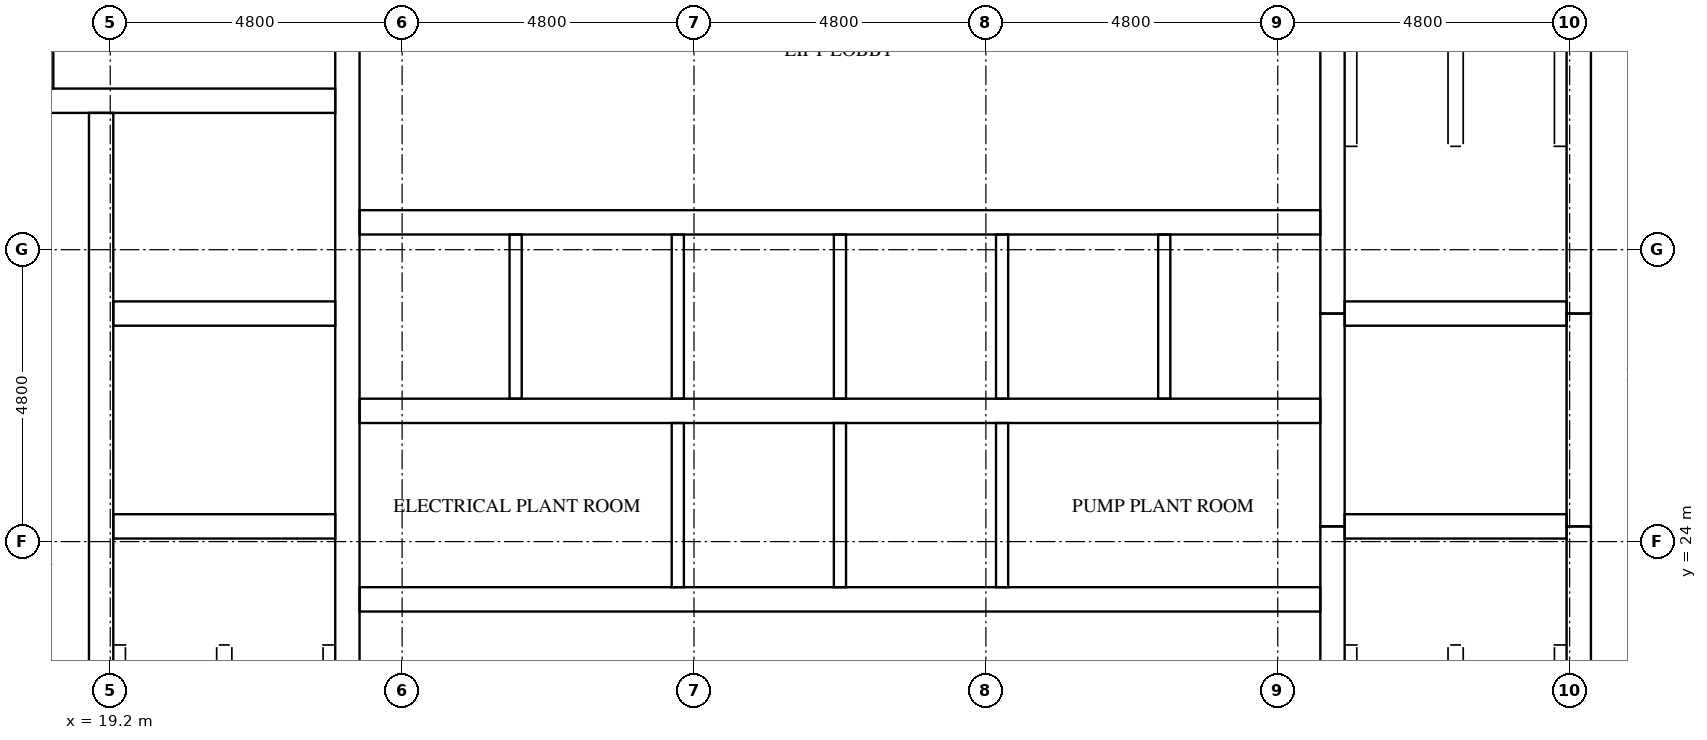
"""IFC4 building model, lengths in metres.
Left out: names, types, materials, properties, quantities, classifications, styles, units other than length and angle.
Written with IfcOpenShell. Run it as: python <this file> out.ifc"""

import sys

from ifc_helpers import new_model, si_unit, direction, frame, frame_2d, origin, place, context, subcontext, project, spatial, rectangle, extrude, element, fill, save


model = new_model("IFC4")
c1 = context("Model", 3, precision=1e-05, world=origin(), true_north=direction((0.0, 1.0)))
c2 = subcontext(c1, "Body", "Model", "MODEL_VIEW")
j1 = project(units=[si_unit("LENGTHUNIT", "METRE"), si_unit("PLANEANGLEUNIT", "RADIAN")], contexts=[c1])
p1 = place(None, origin())
s1 = spatial("IfcSite", under=j1, at=p1, CompositionType="ELEMENT")
p2 = place(p1, origin())
s2 = spatial("IfcBuilding", under=s1, at=p2, CompositionType="ELEMENT")
p3 = place(p2, frame((0.0, 0.0, 286.1)))
s3 = spatial("IfcBuildingStorey", under=s2, at=p3, CompositionType="ELEMENT", Elevation=286.1)
p4 = place(p3, frame((19.05, 15.5, 0.0), z_axis=(0.0, 0.0, 1.0), x_axis=(0.0, 1.0, 0.0)))
e1 = element("IfcWall", 1, at=p4, inside=s3, PredefinedType="SHEAR", context=c2, shape_type="SweptSolid", body=[
    extrude(rectangle(XDim=15.55, YDim=0.4, at=frame_2d((7.775, 0.0))), origin(), (0.0, 0.0, 1.0), 5.1),
])
p5 = place(p4, frame((9.95, 0.0, 0.0)))
e2 = element("IfcOpeningElement", 2, at=p5, cuts=e1, PredefinedType="OPENING", context=c2, shape_type="SweptSolid", body=[
    extrude(rectangle(XDim=1.1, YDim=2.1, at=frame_2d((0.55, 1.05))), frame((0.0, 0.21, 0.0), z_axis=(0.0, -1.0, 0.0), x_axis=(1.0, 0.0, 0.0)), (0.0, 0.0, 1.0), 0.42),
])
p6 = place(p4, frame((13.45, 0.0, 0.0)))
e3 = element("IfcOpeningElement", 3, at=p6, cuts=e1, PredefinedType="OPENING", context=c2, shape_type="SweptSolid", body=[
    extrude(rectangle(XDim=1.1, YDim=2.1, at=frame_2d((0.55, 1.05))), frame((0.0, 0.21, 0.0), z_axis=(0.0, -1.0, 0.0), x_axis=(1.0, 0.0, 0.0)), (0.0, 0.0, 1.0), 0.42),
])
p7 = place(p4, frame((0.7, 0.0, 0.0)))
e4 = element("IfcOpeningElement", 4, at=p7, cuts=e1, PredefinedType="OPENING", context=c2, shape_type="SweptSolid", body=[
    extrude(rectangle(XDim=1.2, YDim=2.1, at=frame_2d((0.6, 1.05))), frame((0.0, 0.21, 0.0), z_axis=(0.0, -1.0, 0.0), x_axis=(1.0, 0.0, 0.0)), (0.0, 0.0, 1.0), 0.42),
])
p8 = place(p3, frame((23.1, 15.5, 0.0), z_axis=(0.0, 0.0, 1.0), x_axis=(0.0, 1.0, 0.0)))
e5 = element("IfcWall", 5, at=p8, inside=s3, PredefinedType="SHEAR", context=c2, shape_type="SweptSolid", body=[
    extrude(rectangle(XDim=21.8, YDim=0.4, at=frame_2d((10.9, 0.0))), origin(), (0.0, 0.0, 1.0), 5.1),
])
p9 = place(p3, frame((39.3, 15.5, 0.0), z_axis=(0.0, 0.0, 1.0), x_axis=(0.0, 1.0, 0.0)))
e6 = element("IfcWall", 6, at=p9, inside=s3, PredefinedType="SHEAR", context=c2, shape_type="SweptSolid", body=[
    extrude(rectangle(XDim=8.75, YDim=0.4, at=frame_2d((4.375, 0.0))), origin(), (0.0, 0.0, 1.0), 5.1),
])
p10 = place(p3, frame((39.3, 24.25, 0.0), z_axis=(0.0, 0.0, 1.0), x_axis=(0.0, 1.0, 0.0)))
e7 = element("IfcWall", 7, at=p10, inside=s3, PredefinedType="SHEAR", context=c2, shape_type="SweptSolid", body=[
    extrude(rectangle(XDim=3.5, YDim=0.4, at=frame_2d((1.75, 0.0))), origin(), (0.0, 0.0, 1.0), 5.1),
])
p11 = place(p3, frame((39.3, 27.75, 0.0), z_axis=(0.0, 0.0, 1.0), x_axis=(0.0, 1.0, 0.0)))
e8 = element("IfcWall", 8, at=p11, inside=s3, PredefinedType="SHEAR", context=c2, shape_type="SweptSolid", body=[
    extrude(rectangle(XDim=9.55, YDim=0.4, at=frame_2d((4.775, 0.0))), origin(), (0.0, 0.0, 1.0), 5.1),
])
p12 = place(p3, frame((43.35, 15.5, 0.0), z_axis=(0.0, 0.0, 1.0), x_axis=(0.0, 1.0, 0.0)))
e9 = element("IfcWall", 9, at=p12, inside=s3, PredefinedType="SHEAR", context=c2, shape_type="SweptSolid", body=[
    extrude(rectangle(XDim=8.75, YDim=0.4, at=frame_2d((4.375, 0.0))), origin(), (0.0, 0.0, 1.0), 5.1),
])
p13 = place(p12, frame((0.7, 0.0, 0.0)))
e10 = element("IfcOpeningElement", 10, at=p13, cuts=e9, PredefinedType="OPENING", context=c2, shape_type="SweptSolid", body=[
    extrude(rectangle(XDim=1.2, YDim=2.1, at=frame_2d((0.6, 1.05))), frame((0.0, 0.21, 0.0), z_axis=(0.0, -1.0, 0.0), x_axis=(1.0, 0.0, 0.0)), (0.0, 0.0, 1.0), 0.42),
])
p14 = place(p3, frame((43.35, 24.25, 0.0), z_axis=(0.0, 0.0, 1.0), x_axis=(0.0, 1.0, 0.0)))
e11 = element("IfcWall", 11, at=p14, inside=s3, PredefinedType="SHEAR", context=c2, shape_type="SweptSolid", body=[
    extrude(rectangle(XDim=3.5, YDim=0.4, at=frame_2d((1.75, 0.0))), origin(), (0.0, 0.0, 1.0), 5.1),
])
p15 = place(p14, frame((1.2, 0.0, 0.0)))
e12 = element("IfcOpeningElement", 12, at=p15, cuts=e11, PredefinedType="OPENING", context=c2, shape_type="SweptSolid", body=[
    extrude(rectangle(XDim=1.1, YDim=2.1, at=frame_2d((0.55, 1.05))), frame((0.0, 0.21, 0.0), z_axis=(0.0, -1.0, 0.0), x_axis=(1.0, 0.0, 0.0)), (0.0, 0.0, 1.0), 0.42),
])
p16 = place(p3, frame((43.35, 27.75, 0.0), z_axis=(0.0, 0.0, 1.0), x_axis=(0.0, 1.0, 0.0)))
e13 = element("IfcWall", 13, at=p16, inside=s3, PredefinedType="SHEAR", context=c2, shape_type="SweptSolid", body=[
    extrude(rectangle(XDim=9.55, YDim=0.4, at=frame_2d((4.775, 0.0))), origin(), (0.0, 0.0, 1.0), 5.1),
])
p17 = place(p16, frame((7.65, 0.0, 0.0)))
e14 = element("IfcOpeningElement", 14, at=p17, cuts=e13, PredefinedType="OPENING", context=c2, shape_type="SweptSolid", body=[
    extrude(rectangle(XDim=1.2, YDim=2.1, at=frame_2d((0.6, 1.05))), frame((0.0, 0.21, 0.0), z_axis=(0.0, -1.0, 0.0), x_axis=(1.0, 0.0, 0.0)), (0.0, 0.0, 1.0), 0.42),
])
for number, where, z_axis, x_axis in (
    (15, (19.25, 24.25, 0.0), (0.0, 0.0, 1.0), (1.0, 0.0, 0.0)),
    (16, (19.25, 27.75, 0.0), (0.0, 0.0, 1.0), (1.0, 0.0, 0.0)),
):
    element("IfcWall", number, at=place(p3, frame(where, z_axis=z_axis, x_axis=x_axis)), inside=s3, PredefinedType="SHEAR", context=c2, shape_type="SweptSolid", body=[
        extrude(rectangle(XDim=3.65, YDim=0.4, at=frame_2d((1.825, 0.0))), origin(), (0.0, 0.0, 1.0), 5.1),
    ])
p18 = place(p3, frame((15.5, 31.25, 0.0), z_axis=(0.0, 0.0, 1.0), x_axis=(1.0, 0.0, 0.0)))
e17 = element("IfcWall", 17, at=p18, inside=s3, PredefinedType="SHEAR", context=c2, shape_type="SweptSolid", body=[
    extrude(rectangle(XDim=7.4, YDim=0.4, at=frame_2d((3.7, 0.0))), origin(), (0.0, 0.0, 1.0), 5.1),
])
for number, where, z_axis, x_axis in (
    (18, (39.5, 24.25, 0.0), (0.0, 0.0, 1.0), (1.0, 0.0, 0.0)),
    (19, (39.5, 27.75, 0.0), (0.0, 0.0, 1.0), (1.0, 0.0, 0.0)),
):
    element("IfcWall", number, at=place(p3, frame(where, z_axis=z_axis, x_axis=x_axis)), inside=s3, PredefinedType="SHEAR", context=c2, shape_type="SweptSolid", body=[
        extrude(rectangle(XDim=3.65, YDim=0.4, at=frame_2d((1.825, 0.0))), origin(), (0.0, 0.0, 1.0), 5.1),
    ])
p19 = place(p3, frame((23.3, 23.05, 0.0), z_axis=(0.0, 0.0, 1.0), x_axis=(1.0, 0.0, 0.0)))
e20 = element("IfcWall", 20, at=p19, inside=s3, PredefinedType="SHEAR", context=c2, shape_type="SweptSolid", body=[
    extrude(rectangle(XDim=15.8, YDim=0.4, at=frame_2d((7.9, 0.0))), origin(), (0.0, 0.0, 1.0), 5.1),
])
p20 = place(p19, frame((6.017, 0.0, 0.0)))
e21 = element("IfcOpeningElement", 21, at=p20, cuts=e20, PredefinedType="OPENING", context=c2, shape_type="SweptSolid", body=[
    extrude(rectangle(XDim=1.1, YDim=2.1, at=frame_2d((0.55, 1.05))), frame((0.0, 0.21, 0.0), z_axis=(0.0, -1.0, 0.0), x_axis=(1.0, 0.0, 0.0)), (0.0, 0.0, 1.0), 0.42),
])
p21 = place(p19, frame((8.683, 0.0, 0.0)))
e22 = element("IfcOpeningElement", 22, at=p21, cuts=e20, PredefinedType="OPENING", context=c2, shape_type="SweptSolid", body=[
    extrude(rectangle(XDim=1.1, YDim=2.1, at=frame_2d((0.55, 1.05))), frame((0.0, 0.21, 0.0), z_axis=(0.0, -1.0, 0.0), x_axis=(1.0, 0.0, 0.0)), (0.0, 0.0, 1.0), 0.42),
])
p22 = place(p19, frame((2.067, 0.0, 0.0)))
e23 = element("IfcOpeningElement", 23, at=p22, cuts=e20, PredefinedType="OPENING", context=c2, shape_type="SweptSolid", body=[
    extrude(rectangle(XDim=1.0, YDim=2.1, at=frame_2d((0.5, 1.05))), frame((0.0, 0.21, 0.0), z_axis=(0.0, -1.0, 0.0), x_axis=(1.0, 0.0, 0.0)), (0.0, 0.0, 1.0), 0.42),
])
p23 = place(p19, frame((12.733, 0.0, 0.0)))
e24 = element("IfcOpeningElement", 24, at=p23, cuts=e20, PredefinedType="OPENING", context=c2, shape_type="SweptSolid", body=[
    extrude(rectangle(XDim=1.0, YDim=2.1, at=frame_2d((0.5, 1.05))), frame((0.0, 0.21, 0.0), z_axis=(0.0, -1.0, 0.0), x_axis=(1.0, 0.0, 0.0)), (0.0, 0.0, 1.0), 0.42),
])
p24 = place(p3, frame((23.3, 26.15, 0.0), z_axis=(0.0, 0.0, 1.0), x_axis=(1.0, 0.0, 0.0)))
e25 = element("IfcWall", 25, at=p24, inside=s3, PredefinedType="SHEAR", context=c2, shape_type="SweptSolid", body=[
    extrude(rectangle(XDim=15.8, YDim=0.4, at=frame_2d((7.9, 0.0))), origin(), (0.0, 0.0, 1.0), 5.1),
])
p25 = place(p3, frame((23.3, 29.25, 0.0), z_axis=(0.0, 0.0, 1.0), x_axis=(1.0, 0.0, 0.0)))
e26 = element("IfcWall", 26, at=p25, inside=s3, PredefinedType="SHEAR", context=c2, shape_type="SweptSolid", body=[
    extrude(rectangle(XDim=15.8, YDim=0.4, at=frame_2d((7.9, 0.0))), origin(), (0.0, 0.0, 1.0), 5.1),
])
p26 = place(p25, frame((0.683, 0.0, 0.0)))
e27 = element("IfcOpeningElement", 27, at=p26, cuts=e26, PredefinedType="OPENING", context=c2, shape_type="SweptSolid", body=[
    extrude(rectangle(XDim=1.1, YDim=2.1, at=frame_2d((0.55, 1.05))), frame((0.0, 0.21, 0.0), z_axis=(0.0, -1.0, 0.0), x_axis=(1.0, 0.0, 0.0)), (0.0, 0.0, 1.0), 0.42),
])
p27 = place(p25, frame((3.35, 0.0, 0.0)))
e28 = element("IfcOpeningElement", 28, at=p27, cuts=e26, PredefinedType="OPENING", context=c2, shape_type="SweptSolid", body=[
    extrude(rectangle(XDim=1.1, YDim=2.1, at=frame_2d((0.55, 1.05))), frame((0.0, 0.21, 0.0), z_axis=(0.0, -1.0, 0.0), x_axis=(1.0, 0.0, 0.0)), (0.0, 0.0, 1.0), 0.42),
])
p28 = place(p25, frame((6.017, 0.0, 0.0)))
e29 = element("IfcOpeningElement", 29, at=p28, cuts=e26, PredefinedType="OPENING", context=c2, shape_type="SweptSolid", body=[
    extrude(rectangle(XDim=1.1, YDim=2.1, at=frame_2d((0.55, 1.05))), frame((0.0, 0.21, 0.0), z_axis=(0.0, -1.0, 0.0), x_axis=(1.0, 0.0, 0.0)), (0.0, 0.0, 1.0), 0.42),
])
p29 = place(p25, frame((8.683, 0.0, 0.0)))
e30 = element("IfcOpeningElement", 30, at=p29, cuts=e26, PredefinedType="OPENING", context=c2, shape_type="SweptSolid", body=[
    extrude(rectangle(XDim=1.1, YDim=2.1, at=frame_2d((0.55, 1.05))), frame((0.0, 0.21, 0.0), z_axis=(0.0, -1.0, 0.0), x_axis=(1.0, 0.0, 0.0)), (0.0, 0.0, 1.0), 0.42),
])
p30 = place(p25, frame((11.35, 0.0, 0.0)))
e31 = element("IfcOpeningElement", 31, at=p30, cuts=e26, PredefinedType="OPENING", context=c2, shape_type="SweptSolid", body=[
    extrude(rectangle(XDim=1.1, YDim=2.1, at=frame_2d((0.55, 1.05))), frame((0.0, 0.21, 0.0), z_axis=(0.0, -1.0, 0.0), x_axis=(1.0, 0.0, 0.0)), (0.0, 0.0, 1.0), 0.42),
])
p31 = place(p25, frame((14.017, 0.0, 0.0)))
e32 = element("IfcOpeningElement", 32, at=p31, cuts=e26, PredefinedType="OPENING", context=c2, shape_type="SweptSolid", body=[
    extrude(rectangle(XDim=1.1, YDim=2.1, at=frame_2d((0.55, 1.05))), frame((0.0, 0.21, 0.0), z_axis=(0.0, -1.0, 0.0), x_axis=(1.0, 0.0, 0.0)), (0.0, 0.0, 1.0), 0.42),
])
for number, where, z_axis, x_axis in (
    (33, (25.867, 26.35, 0.0), (0.0, 0.0, 1.0), (0.0, 1.0, 0.0)),
    (34, (28.533, 23.25, 0.0), (0.0, 0.0, 1.0), (0.0, 1.0, 0.0)),
    (35, (28.533, 26.35, 0.0), (0.0, 0.0, 1.0), (0.0, 1.0, 0.0)),
    (36, (31.2, 23.25, 0.0), (0.0, 0.0, 1.0), (0.0, 1.0, 0.0)),
    (37, (31.2, 26.35, 0.0), (0.0, 0.0, 1.0), (0.0, 1.0, 0.0)),
    (38, (33.867, 23.25, 0.0), (0.0, 0.0, 1.0), (0.0, 1.0, 0.0)),
    (39, (33.867, 26.35, 0.0), (0.0, 0.0, 1.0), (0.0, 1.0, 0.0)),
    (40, (36.533, 26.35, 0.0), (0.0, 0.0, 1.0), (0.0, 1.0, 0.0)),
):
    element("IfcWall", number, at=place(p3, frame(where, z_axis=z_axis, x_axis=x_axis)), inside=s3, PredefinedType="SOLIDWALL", context=c2, shape_type="SweptSolid", body=[
        extrude(rectangle(XDim=2.7, YDim=0.2, at=frame_2d((1.35, 0.0))), origin(), (0.0, 0.0, 1.0), 5.1),
    ])
p32 = place(p3, frame((18.164, 31.45, 0.0), z_axis=(0.0, 0.0, 1.0), x_axis=(0.0, 1.0, 0.0)))
e41 = element("IfcWall", 41, at=p32, inside=s3, PredefinedType="PARTITIONING", context=c2, shape_type="SweptSolid", body=[
    extrude(rectangle(XDim=5.85, YDim=0.2, at=frame_2d((2.925, 0.0))), origin(), (0.0, 0.0, 1.0), 5.1),
])
p33 = place(p26, origin())
e42 = element("IfcDoor", 42, at=p33, inside=s3, OperationType="DOUBLE_DOOR_SLIDING", PredefinedType="DOOR", context=c2, shape_type="SweptSolid", body=[
    extrude(rectangle(XDim=1.1, YDim=2.1, at=frame_2d((0.55, 1.05))), frame((0.0, 0.025, 0.0), z_axis=(0.0, -1.0, 0.0), x_axis=(1.0, 0.0, 0.0)), (0.0, 0.0, 1.0), 0.05),
])
fill(e27, e42)
p34 = place(p27, origin())
e43 = element("IfcDoor", 43, at=p34, inside=s3, OperationType="DOUBLE_DOOR_SLIDING", PredefinedType="DOOR", context=c2, shape_type="SweptSolid", body=[
    extrude(rectangle(XDim=1.1, YDim=2.1, at=frame_2d((0.55, 1.05))), frame((0.0, 0.025, 0.0), z_axis=(0.0, -1.0, 0.0), x_axis=(1.0, 0.0, 0.0)), (0.0, 0.0, 1.0), 0.05),
])
fill(e28, e43)
p35 = place(p28, origin())
e44 = element("IfcDoor", 44, at=p35, inside=s3, OperationType="DOUBLE_DOOR_SLIDING", PredefinedType="DOOR", context=c2, shape_type="SweptSolid", body=[
    extrude(rectangle(XDim=1.1, YDim=2.1, at=frame_2d((0.55, 1.05))), frame((0.0, 0.025, 0.0), z_axis=(0.0, -1.0, 0.0), x_axis=(1.0, 0.0, 0.0)), (0.0, 0.0, 1.0), 0.05),
])
fill(e29, e44)
p36 = place(p29, origin())
e45 = element("IfcDoor", 45, at=p36, inside=s3, OperationType="DOUBLE_DOOR_SLIDING", PredefinedType="DOOR", context=c2, shape_type="SweptSolid", body=[
    extrude(rectangle(XDim=1.1, YDim=2.1, at=frame_2d((0.55, 1.05))), frame((0.0, 0.025, 0.0), z_axis=(0.0, -1.0, 0.0), x_axis=(1.0, 0.0, 0.0)), (0.0, 0.0, 1.0), 0.05),
])
fill(e30, e45)
p37 = place(p30, origin())
e46 = element("IfcDoor", 46, at=p37, inside=s3, OperationType="DOUBLE_DOOR_SLIDING", PredefinedType="DOOR", context=c2, shape_type="SweptSolid", body=[
    extrude(rectangle(XDim=1.1, YDim=2.1, at=frame_2d((0.55, 1.05))), frame((0.0, 0.025, 0.0), z_axis=(0.0, -1.0, 0.0), x_axis=(1.0, 0.0, 0.0)), (0.0, 0.0, 1.0), 0.05),
])
fill(e31, e46)
p38 = place(p31, origin())
e47 = element("IfcDoor", 47, at=p38, inside=s3, OperationType="DOUBLE_DOOR_SLIDING", PredefinedType="DOOR", context=c2, shape_type="SweptSolid", body=[
    extrude(rectangle(XDim=1.1, YDim=2.1, at=frame_2d((0.55, 1.05))), frame((0.0, 0.025, 0.0), z_axis=(0.0, -1.0, 0.0), x_axis=(1.0, 0.0, 0.0)), (0.0, 0.0, 1.0), 0.05),
])
fill(e32, e47)
p39 = place(p20, origin())
e48 = element("IfcDoor", 48, at=p39, inside=s3, OperationType="DOUBLE_DOOR_SLIDING", PredefinedType="DOOR", context=c2, shape_type="SweptSolid", body=[
    extrude(rectangle(XDim=1.1, YDim=2.1, at=frame_2d((0.55, 1.05))), frame((0.0, 0.025, 0.0), z_axis=(0.0, -1.0, 0.0), x_axis=(1.0, 0.0, 0.0)), (0.0, 0.0, 1.0), 0.05),
])
fill(e21, e48)
p40 = place(p21, origin())
e49 = element("IfcDoor", 49, at=p40, inside=s3, OperationType="DOUBLE_DOOR_SLIDING", PredefinedType="DOOR", context=c2, shape_type="SweptSolid", body=[
    extrude(rectangle(XDim=1.1, YDim=2.1, at=frame_2d((0.55, 1.05))), frame((0.0, 0.025, 0.0), z_axis=(0.0, -1.0, 0.0), x_axis=(1.0, 0.0, 0.0)), (0.0, 0.0, 1.0), 0.05),
])
fill(e22, e49)
p41 = place(p5, origin())
e50 = element("IfcDoor", 50, at=p41, inside=s3, OperationType="DOUBLE_DOOR_SLIDING", PredefinedType="DOOR", context=c2, shape_type="SweptSolid", body=[
    extrude(rectangle(XDim=1.1, YDim=2.1, at=frame_2d((0.55, 1.05))), frame((0.0, 0.025, 0.0), z_axis=(0.0, -1.0, 0.0), x_axis=(1.0, 0.0, 0.0)), (0.0, 0.0, 1.0), 0.05),
])
fill(e2, e50)
p42 = place(p6, origin())
e51 = element("IfcDoor", 51, at=p42, inside=s3, OperationType="DOUBLE_DOOR_SLIDING", PredefinedType="DOOR", context=c2, shape_type="SweptSolid", body=[
    extrude(rectangle(XDim=1.1, YDim=2.1, at=frame_2d((0.55, 1.05))), frame((0.0, 0.025, 0.0), z_axis=(0.0, -1.0, 0.0), x_axis=(1.0, 0.0, 0.0)), (0.0, 0.0, 1.0), 0.05),
])
fill(e3, e51)
p43 = place(p15, origin())
e52 = element("IfcDoor", 52, at=p43, inside=s3, OperationType="DOUBLE_DOOR_SLIDING", PredefinedType="DOOR", context=c2, shape_type="SweptSolid", body=[
    extrude(rectangle(XDim=1.1, YDim=2.1, at=frame_2d((0.55, 1.05))), frame((0.0, 0.025, 0.0), z_axis=(0.0, -1.0, 0.0), x_axis=(1.0, 0.0, 0.0)), (0.0, 0.0, 1.0), 0.05),
])
fill(e12, e52)
p44 = place(p22, frame((1.0, 0.0, 0.0), z_axis=(0.0, 0.0, 1.0), x_axis=(-1.0, 0.0, 0.0)))
e53 = element("IfcDoor", 53, at=p44, inside=s3, OperationType="SINGLE_SWING_RIGHT", PredefinedType="DOOR", context=c2, shape_type="SweptSolid", body=[
    extrude(rectangle(XDim=1.0, YDim=2.1, at=frame_2d((0.5, 1.05))), frame((0.0, 0.025, 0.0), z_axis=(0.0, -1.0, 0.0), x_axis=(1.0, 0.0, 0.0)), (0.0, 0.0, 1.0), 0.05),
])
fill(e23, e53)
p45 = place(p23, frame((1.0, 0.0, 0.0), z_axis=(0.0, 0.0, 1.0), x_axis=(-1.0, 0.0, 0.0)))
e54 = element("IfcDoor", 54, at=p45, inside=s3, OperationType="SINGLE_SWING_LEFT", PredefinedType="DOOR", context=c2, shape_type="SweptSolid", body=[
    extrude(rectangle(XDim=1.0, YDim=2.1, at=frame_2d((0.5, 1.05))), frame((0.0, 0.025, 0.0), z_axis=(0.0, -1.0, 0.0), x_axis=(1.0, 0.0, 0.0)), (0.0, 0.0, 1.0), 0.05),
])
fill(e24, e54)
save(model, sys.argv[1])
